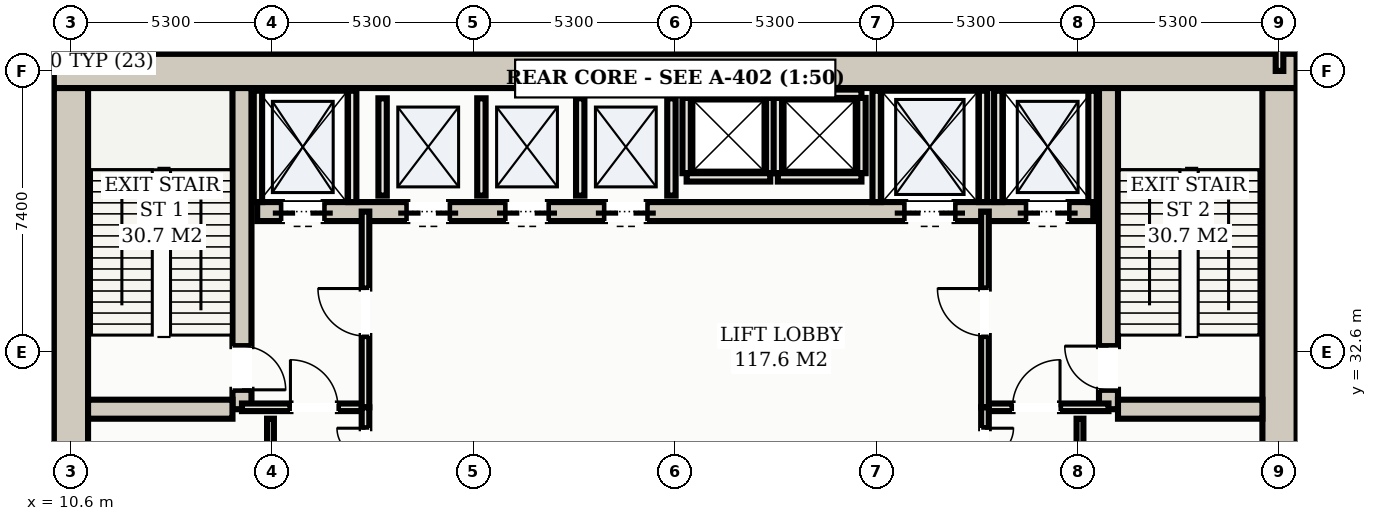
"""IFC4 building model, lengths in metres.
Left out: names, types, materials, properties, quantities, classifications, styles, units other than length and angle.
Written with IfcOpenShell. Run it as: python <this file> out.ifc"""

import sys

from ifc_helpers import new_model, si_unit, direction, frame, frame_2d, origin, place, context, subcontext, project, spatial, rectangle, extrude, element, fill, save


model = new_model("IFC4")
c1 = context("Model", 3, precision=1e-05, world=origin(), true_north=direction((0.0, 1.0)))
c2 = subcontext(c1, "Body", "Model", "MODEL_VIEW")
j1 = project(units=[si_unit("LENGTHUNIT", "METRE"), si_unit("PLANEANGLEUNIT", "RADIAN")], contexts=[c1])
p1 = place(None, origin())
s1 = spatial("IfcSite", under=j1, at=p1, CompositionType="ELEMENT")
p2 = place(p1, origin())
s2 = spatial("IfcBuilding", under=s1, at=p2, CompositionType="ELEMENT")
p3 = place(p2, origin())
s3 = spatial("IfcBuildingStorey", under=s2, at=p3, CompositionType="ELEMENT", Elevation=0.0)
p4 = place(p3, frame((10.15, 40.0, 0.0), z_axis=(0.0, 0.0, 1.0), x_axis=(1.0, 0.0, 0.0)))
e1 = element("IfcWall", 1, at=p4, inside=s3, PredefinedType="SHEAR", context=c2, shape_type="SweptSolid", body=[
    extrude(rectangle(XDim=32.7, YDim=0.9, at=frame_2d((16.35, 0.0))), origin(), (0.0, 0.0, 1.0), 4.95),
])
for number, where, z_axis, x_axis in (
    (2, (10.6, 25.65, 0.0), (0.0, 0.0, 1.0), (0.0, 1.0, 0.0)),
    (3, (42.4, 25.65, 0.0), (0.0, 0.0, 1.0), (0.0, 1.0, 0.0)),
):
    element("IfcWall", number, at=place(p3, frame(where, z_axis=z_axis, x_axis=x_axis)), inside=s3, PredefinedType="SHEAR", context=c2, shape_type="SweptSolid", body=[
        extrude(rectangle(XDim=13.9, YDim=0.9, at=frame_2d((6.95, 0.0))), origin(), (0.0, 0.0, 1.0), 4.95),
    ])
p5 = place(p3, frame((15.1, 31.1, 0.0), z_axis=(0.0, 0.0, 1.0), x_axis=(0.0, 1.0, 0.0)))
e4 = element("IfcWall", 4, at=p5, inside=s3, PredefinedType="SHEAR", context=c2, shape_type="SweptSolid", body=[
    extrude(rectangle(XDim=8.45, YDim=0.5, at=frame_2d((4.225, 0.0))), origin(), (0.0, 0.0, 1.0), 4.95),
])
p6 = place(p5, frame((0.51, 0.0, 0.0)))
e5 = element("IfcOpeningElement", 5, at=p6, cuts=e4, PredefinedType="OPENING", context=c2, shape_type="SweptSolid", body=[
    extrude(rectangle(XDim=1.15, YDim=2.2, at=frame_2d((0.575, 1.1))), frame((0.0, 0.26, 0.0), z_axis=(0.0, -1.0, 0.0), x_axis=(1.0, 0.0, 0.0)), (0.0, 0.0, 1.0), 0.52),
])
p7 = place(p3, frame((11.05, 31.1, 0.0), z_axis=(0.0, 0.0, 1.0), x_axis=(1.0, 0.0, 0.0)))
e6 = element("IfcWall", 6, at=p7, inside=s3, PredefinedType="SHEAR", context=c2, shape_type="SweptSolid", body=[
    extrude(rectangle(XDim=3.8, YDim=0.5, at=frame_2d((1.9, 0.0))), origin(), (0.0, 0.0, 1.0), 4.95),
])
p8 = place(p3, frame((37.9, 31.1, 0.0), z_axis=(0.0, 0.0, 1.0), x_axis=(0.0, 1.0, 0.0)))
e7 = element("IfcWall", 7, at=p8, inside=s3, PredefinedType="SHEAR", context=c2, shape_type="SweptSolid", body=[
    extrude(rectangle(XDim=8.45, YDim=0.5, at=frame_2d((4.225, 0.0))), origin(), (0.0, 0.0, 1.0), 4.95),
])
p9 = place(p8, frame((0.51, 0.0, 0.0)))
e8 = element("IfcOpeningElement", 8, at=p9, cuts=e7, PredefinedType="OPENING", context=c2, shape_type="SweptSolid", body=[
    extrude(rectangle(XDim=1.15, YDim=2.2, at=frame_2d((0.575, 1.1))), frame((0.0, 0.26, 0.0), z_axis=(0.0, -1.0, 0.0), x_axis=(1.0, 0.0, 0.0)), (0.0, 0.0, 1.0), 0.52),
])
p10 = place(p3, frame((38.15, 31.1, 0.0), z_axis=(0.0, 0.0, 1.0), x_axis=(1.0, 0.0, 0.0)))
e9 = element("IfcWall", 9, at=p10, inside=s3, PredefinedType="SHEAR", context=c2, shape_type="SweptSolid", body=[
    extrude(rectangle(XDim=3.8, YDim=0.5, at=frame_2d((1.9, 0.0))), origin(), (0.0, 0.0, 1.0), 4.95),
])
p11 = place(p3, frame((15.5, 36.3, 0.0), z_axis=(0.0, 0.0, 1.0), x_axis=(1.0, 0.0, 0.0)))
e10 = element("IfcWall", 10, at=p11, inside=s3, PredefinedType="SHEAR", context=c2, shape_type="SweptSolid", body=[
    extrude(rectangle(XDim=22.0, YDim=0.5, at=frame_2d((11.0, 0.0))), origin(), (0.0, 0.0, 1.0), 4.95),
])
p12 = place(p11, frame((0.65, 0.0, 0.0)))
e11 = element("IfcOpeningElement", 11, at=p12, cuts=e10, PredefinedType="OPENING", context=c2, shape_type="SweptSolid", body=[
    extrude(rectangle(XDim=1.1, YDim=2.15, at=frame_2d((0.55, 1.075))), frame((0.0, 0.26, 0.0), z_axis=(0.0, -1.0, 0.0), x_axis=(1.0, 0.0, 0.0)), (0.0, 0.0, 1.0), 0.52),
])
p13 = place(p11, frame((20.25, 0.0, 0.0)))
e12 = element("IfcOpeningElement", 12, at=p13, cuts=e10, PredefinedType="OPENING", context=c2, shape_type="SweptSolid", body=[
    extrude(rectangle(XDim=1.1, YDim=2.15, at=frame_2d((0.55, 1.075))), frame((0.0, 0.26, 0.0), z_axis=(0.0, -1.0, 0.0), x_axis=(1.0, 0.0, 0.0)), (0.0, 0.0, 1.0), 0.52),
])
p14 = place(p11, frame((17.05, 0.0, 0.0)))
e13 = element("IfcOpeningElement", 13, at=p14, cuts=e10, PredefinedType="OPENING", context=c2, shape_type="SweptSolid", body=[
    extrude(rectangle(XDim=1.3, YDim=2.2, at=frame_2d((0.65, 1.1))), frame((0.0, 0.26, 0.0), z_axis=(0.0, -1.0, 0.0), x_axis=(1.0, 0.0, 0.0)), (0.0, 0.0, 1.0), 0.52),
])
p15 = place(p11, frame((3.95, 0.0, 0.0)))
e14 = element("IfcOpeningElement", 14, at=p15, cuts=e10, PredefinedType="OPENING", context=c2, shape_type="SweptSolid", body=[
    extrude(rectangle(XDim=1.1, YDim=2.15, at=frame_2d((0.55, 1.075))), frame((0.0, 0.26, 0.0), z_axis=(0.0, -1.0, 0.0), x_axis=(1.0, 0.0, 0.0)), (0.0, 0.0, 1.0), 0.52),
])
p16 = place(p11, frame((6.55, 0.0, 0.0)))
e15 = element("IfcOpeningElement", 15, at=p16, cuts=e10, PredefinedType="OPENING", context=c2, shape_type="SweptSolid", body=[
    extrude(rectangle(XDim=1.1, YDim=2.15, at=frame_2d((0.55, 1.075))), frame((0.0, 0.26, 0.0), z_axis=(0.0, -1.0, 0.0), x_axis=(1.0, 0.0, 0.0)), (0.0, 0.0, 1.0), 0.52),
])
p17 = place(p11, frame((9.15, 0.0, 0.0)))
e16 = element("IfcOpeningElement", 16, at=p17, cuts=e10, PredefinedType="OPENING", context=c2, shape_type="SweptSolid", body=[
    extrude(rectangle(XDim=1.1, YDim=2.15, at=frame_2d((0.55, 1.075))), frame((0.0, 0.26, 0.0), z_axis=(0.0, -1.0, 0.0), x_axis=(1.0, 0.0, 0.0)), (0.0, 0.0, 1.0), 0.52),
])
for number, where, z_axis, x_axis in (
    (17, (15.52, 36.55, 0.0), (0.0, 0.0, 1.0), (0.0, 1.0, 0.0)),
    (18, (18.0, 36.55, 0.0), (0.0, 0.0, 1.0), (0.0, 1.0, 0.0)),
    (19, (35.0, 36.55, 0.0), (0.0, 0.0, 1.0), (0.0, 1.0, 0.0)),
    (20, (37.48, 36.55, 0.0), (0.0, 0.0, 1.0), (0.0, 1.0, 0.0)),
    (21, (31.8, 36.55, 0.0), (0.0, 0.0, 1.0), (0.0, 1.0, 0.0)),
    (22, (34.6, 36.55, 0.0), (0.0, 0.0, 1.0), (0.0, 1.0, 0.0)),
):
    element("IfcWall", number, at=place(p3, frame(where, z_axis=z_axis, x_axis=x_axis)), inside=s3, PredefinedType="SOLIDWALL", context=c2, shape_type="SweptSolid", body=[
        extrude(rectangle(XDim=2.93, YDim=0.22, at=frame_2d((1.465, 0.0))), origin(), (0.0, 0.0, 1.0), 4.95),
    ])
for number, where, z_axis, x_axis in (
    (23, (18.8, 36.72, 0.0), (0.0, 0.0, 1.0), (0.0, 1.0, 0.0)),
    (24, (21.4, 36.72, 0.0), (0.0, 0.0, 1.0), (0.0, 1.0, 0.0)),
    (25, (24.0, 36.72, 0.0), (0.0, 0.0, 1.0), (0.0, 1.0, 0.0)),
    (26, (26.4, 36.72, 0.0), (0.0, 0.0, 1.0), (0.0, 1.0, 0.0)),
):
    element("IfcWall", number, at=place(p3, frame(where, z_axis=z_axis, x_axis=x_axis)), inside=s3, PredefinedType="SOLIDWALL", context=c2, shape_type="SweptSolid", body=[
        extrude(rectangle(XDim=2.56, YDim=0.22, at=frame_2d((1.28, 0.0))), origin(), (0.0, 0.0, 1.0), 4.95),
    ])
for number, where, z_axis, x_axis in (
    (27, (26.8, 37.31, 0.0), (0.0, 0.0, 1.0), (0.0, 1.0, 0.0)),
    (28, (29.0, 37.31, 0.0), (0.0, 0.0, 1.0), (0.0, 1.0, 0.0)),
):
    element("IfcWall", number, at=place(p3, frame(where, z_axis=z_axis, x_axis=x_axis)), inside=s3, PredefinedType="SOLIDWALL", context=c2, shape_type="SweptSolid", body=[
        extrude(rectangle(XDim=1.98, YDim=0.22, at=frame_2d((0.99, 0.0))), origin(), (0.0, 0.0, 1.0), 4.95),
    ])
for number, where, z_axis, x_axis in (
    (29, (26.8, 39.4, 0.0), (0.0, 0.0, 1.0), (1.0, 0.0, 0.0)),
    (30, (26.8, 37.2, 0.0), (0.0, 0.0, 1.0), (1.0, 0.0, 0.0)),
):
    element("IfcWall", number, at=place(p3, frame(where, z_axis=z_axis, x_axis=x_axis)), inside=s3, PredefinedType="SOLIDWALL", context=c2, shape_type="SweptSolid", body=[
        extrude(rectangle(XDim=2.2, YDim=0.22, at=frame_2d((1.1, 0.0))), origin(), (0.0, 0.0, 1.0), 4.95),
    ])
for number, where, z_axis, x_axis in (
    (31, (29.2, 37.31, 0.0), (0.0, 0.0, 1.0), (0.0, 1.0, 0.0)),
    (32, (31.4, 37.31, 0.0), (0.0, 0.0, 1.0), (0.0, 1.0, 0.0)),
):
    element("IfcWall", number, at=place(p3, frame(where, z_axis=z_axis, x_axis=x_axis)), inside=s3, PredefinedType="SOLIDWALL", context=c2, shape_type="SweptSolid", body=[
        extrude(rectangle(XDim=1.98, YDim=0.22, at=frame_2d((0.99, 0.0))), origin(), (0.0, 0.0, 1.0), 4.95),
    ])
for number, where, z_axis, x_axis in (
    (33, (29.2, 39.4, 0.0), (0.0, 0.0, 1.0), (1.0, 0.0, 0.0)),
    (34, (29.2, 37.2, 0.0), (0.0, 0.0, 1.0), (1.0, 0.0, 0.0)),
):
    element("IfcWall", number, at=place(p3, frame(where, z_axis=z_axis, x_axis=x_axis)), inside=s3, PredefinedType="SOLIDWALL", context=c2, shape_type="SweptSolid", body=[
        extrude(rectangle(XDim=2.2, YDim=0.22, at=frame_2d((1.1, 0.0))), origin(), (0.0, 0.0, 1.0), 4.95),
    ])
p18 = place(p3, frame((15.1, 31.15, 0.0), z_axis=(0.0, 0.0, 1.0), x_axis=(1.0, 0.0, 0.0)))
e35 = element("IfcWall", 35, at=p18, inside=s3, PredefinedType="PARTITIONING", context=c2, shape_type="SweptSolid", body=[
    extrude(rectangle(XDim=3.25, YDim=0.2, at=frame_2d((1.625, 0.0))), origin(), (0.0, 0.0, 1.0), 4.95),
])
p19 = place(p18, frame((1.275, 0.0, 0.0)))
e36 = element("IfcOpeningElement", 36, at=p19, cuts=e35, PredefinedType="OPENING", context=c2, shape_type="SweptSolid", body=[
    extrude(rectangle(XDim=1.25, YDim=2.2, at=frame_2d((0.625, 1.1))), frame((0.0, 0.11, 0.0), z_axis=(0.0, -1.0, 0.0), x_axis=(1.0, 0.0, 0.0)), (0.0, 0.0, 1.0), 0.22),
])
p20 = place(p3, frame((18.35, 31.15, 0.0), z_axis=(0.0, 0.0, 1.0), x_axis=(0.0, 1.0, 0.0)))
e37 = element("IfcWall", 37, at=p20, inside=s3, PredefinedType="PARTITIONING", context=c2, shape_type="SweptSolid", body=[
    extrude(rectangle(XDim=5.15, YDim=0.2, at=frame_2d((2.575, 0.0))), origin(), (0.0, 0.0, 1.0), 4.95),
])
p21 = place(p20, frame((1.875, 0.0, 0.0)))
e38 = element("IfcOpeningElement", 38, at=p21, cuts=e37, PredefinedType="OPENING", context=c2, shape_type="SweptSolid", body=[
    extrude(rectangle(XDim=1.25, YDim=2.2, at=frame_2d((0.625, 1.1))), frame((0.0, 0.11, 0.0), z_axis=(0.0, -1.0, 0.0), x_axis=(1.0, 0.0, 0.0)), (0.0, 0.0, 1.0), 0.22),
])
p22 = place(p3, frame((34.65, 31.15, 0.0), z_axis=(0.0, 0.0, 1.0), x_axis=(1.0, 0.0, 0.0)))
e39 = element("IfcWall", 39, at=p22, inside=s3, PredefinedType="PARTITIONING", context=c2, shape_type="SweptSolid", body=[
    extrude(rectangle(XDim=3.25, YDim=0.2, at=frame_2d((1.625, 0.0))), origin(), (0.0, 0.0, 1.0), 4.95),
])
p23 = place(p22, frame((0.725, 0.0, 0.0)))
e40 = element("IfcOpeningElement", 40, at=p23, cuts=e39, PredefinedType="OPENING", context=c2, shape_type="SweptSolid", body=[
    extrude(rectangle(XDim=1.25, YDim=2.2, at=frame_2d((0.625, 1.1))), frame((0.0, 0.11, 0.0), z_axis=(0.0, -1.0, 0.0), x_axis=(1.0, 0.0, 0.0)), (0.0, 0.0, 1.0), 0.22),
])
p24 = place(p3, frame((34.65, 31.15, 0.0), z_axis=(0.0, 0.0, 1.0), x_axis=(0.0, 1.0, 0.0)))
e41 = element("IfcWall", 41, at=p24, inside=s3, PredefinedType="PARTITIONING", context=c2, shape_type="SweptSolid", body=[
    extrude(rectangle(XDim=5.15, YDim=0.2, at=frame_2d((2.575, 0.0))), origin(), (0.0, 0.0, 1.0), 4.95),
])
p25 = place(p24, frame((1.875, 0.0, 0.0)))
e42 = element("IfcOpeningElement", 42, at=p25, cuts=e41, PredefinedType="OPENING", context=c2, shape_type="SweptSolid", body=[
    extrude(rectangle(XDim=1.25, YDim=2.2, at=frame_2d((0.625, 1.1))), frame((0.0, 0.11, 0.0), z_axis=(0.0, -1.0, 0.0), x_axis=(1.0, 0.0, 0.0)), (0.0, 0.0, 1.0), 0.22),
])
p26 = place(p3, frame((15.85, 25.65, 0.0), z_axis=(0.0, 0.0, 1.0), x_axis=(0.0, 1.0, 0.0)))
e43 = element("IfcWall", 43, at=p26, inside=s3, PredefinedType="PARTITIONING", context=c2, shape_type="SweptSolid", body=[
    extrude(rectangle(XDim=5.2, YDim=0.18, at=frame_2d((2.6, 0.0))), origin(), (0.0, 0.0, 1.0), 4.95),
])
p27 = place(p26, frame((2.14, 0.0, 0.0)))
e44 = element("IfcOpeningElement", 44, at=p27, cuts=e43, PredefinedType="OPENING", context=c2, shape_type="SweptSolid", body=[
    extrude(rectangle(XDim=0.92, YDim=2.15, at=frame_2d((0.46, 1.075))), frame((0.0, 0.1, 0.0), z_axis=(0.0, -1.0, 0.0), x_axis=(1.0, 0.0, 0.0)), (0.0, 0.0, 1.0), 0.2),
])
p28 = place(p3, frame((37.15, 25.65, 0.0), z_axis=(0.0, 0.0, 1.0), x_axis=(0.0, 1.0, 0.0)))
e45 = element("IfcWall", 45, at=p28, inside=s3, PredefinedType="PARTITIONING", context=c2, shape_type="SweptSolid", body=[
    extrude(rectangle(XDim=5.2, YDim=0.18, at=frame_2d((2.6, 0.0))), origin(), (0.0, 0.0, 1.0), 4.95),
])
p29 = place(p28, frame((2.14, 0.0, 0.0)))
e46 = element("IfcOpeningElement", 46, at=p29, cuts=e45, PredefinedType="OPENING", context=c2, shape_type="SweptSolid", body=[
    extrude(rectangle(XDim=0.92, YDim=2.15, at=frame_2d((0.46, 1.075))), frame((0.0, 0.1, 0.0), z_axis=(0.0, -1.0, 0.0), x_axis=(1.0, 0.0, 0.0)), (0.0, 0.0, 1.0), 0.2),
])
p30 = place(p3, frame((18.35, 28.55, 0.0), z_axis=(0.0, 0.0, 1.0), x_axis=(0.0, 1.0, 0.0)))
e47 = element("IfcWall", 47, at=p30, inside=s3, PredefinedType="PARTITIONING", context=c2, shape_type="SweptSolid", body=[
    extrude(rectangle(XDim=2.6, YDim=0.2, at=frame_2d((1.3, 0.0))), origin(), (0.0, 0.0, 1.0), 4.95),
])
p31 = place(p30, frame((0.55, 0.0, 0.0)))
e48 = element("IfcOpeningElement", 48, at=p31, cuts=e47, PredefinedType="OPENING", context=c2, shape_type="SweptSolid", body=[
    extrude(rectangle(XDim=1.5, YDim=2.25, at=frame_2d((0.75, 1.125))), frame((0.0, 0.11, 0.0), z_axis=(0.0, -1.0, 0.0), x_axis=(1.0, 0.0, 0.0)), (0.0, 0.0, 1.0), 0.22),
])
p32 = place(p3, frame((34.65, 28.55, 0.0), z_axis=(0.0, 0.0, 1.0), x_axis=(0.0, 1.0, 0.0)))
e49 = element("IfcWall", 49, at=p32, inside=s3, PredefinedType="PARTITIONING", context=c2, shape_type="SweptSolid", body=[
    extrude(rectangle(XDim=2.6, YDim=0.2, at=frame_2d((1.3, 0.0))), origin(), (0.0, 0.0, 1.0), 4.95),
])
p33 = place(p32, frame((0.55, 0.0, 0.0)))
e50 = element("IfcOpeningElement", 50, at=p33, cuts=e49, PredefinedType="OPENING", context=c2, shape_type="SweptSolid", body=[
    extrude(rectangle(XDim=1.5, YDim=2.25, at=frame_2d((0.75, 1.125))), frame((0.0, 0.11, 0.0), z_axis=(0.0, -1.0, 0.0), x_axis=(1.0, 0.0, 0.0)), (0.0, 0.0, 1.0), 0.22),
])
p34 = place(p3, frame((10.6, 40.0, 0.0), z_axis=(0.0, 0.0, 1.0), x_axis=(0.0, 1.0, 0.0)))
e51 = element("IfcWall", 51, at=p34, inside=s3, PredefinedType="PARTITIONING", context=c2, shape_type="SweptSolid", body=[
    extrude(rectangle(XDim=6.47, YDim=0.2, at=frame_2d((3.235, 0.0))), origin(), (0.0, 0.0, 1.0), 4.95),
])
p35 = place(p34, frame((1.3, 0.0, 0.0)))
e52 = element("IfcOpeningElement", 52, at=p35, cuts=e51, PredefinedType="OPENING", context=c2, shape_type="SweptSolid", body=[
    extrude(rectangle(XDim=1.5, YDim=2.25, at=frame_2d((0.75, 1.125))), frame((0.0, 0.11, 0.0), z_axis=(0.0, -1.0, 0.0), x_axis=(1.0, 0.0, 0.0)), (0.0, 0.0, 1.0), 0.22),
])
p36 = place(p3, frame((42.4, 40.0, 0.0), z_axis=(0.0, 0.0, 1.0), x_axis=(0.0, 1.0, 0.0)))
e53 = element("IfcWall", 53, at=p36, inside=s3, PredefinedType="PARTITIONING", context=c2, shape_type="SweptSolid", body=[
    extrude(rectangle(XDim=6.47, YDim=0.2, at=frame_2d((3.235, 0.0))), origin(), (0.0, 0.0, 1.0), 4.95),
])
p37 = place(p36, frame((1.3, 0.0, 0.0)))
e54 = element("IfcOpeningElement", 54, at=p37, cuts=e53, PredefinedType="OPENING", context=c2, shape_type="SweptSolid", body=[
    extrude(rectangle(XDim=1.5, YDim=2.25, at=frame_2d((0.75, 1.125))), frame((0.0, 0.11, 0.0), z_axis=(0.0, -1.0, 0.0), x_axis=(1.0, 0.0, 0.0)), (0.0, 0.0, 1.0), 0.22),
])
p38 = place(p12, frame((1.1, 0.0, 0.0), z_axis=(0.0, 0.0, 1.0), x_axis=(-1.0, 0.0, 0.0)))
e55 = element("IfcDoor", 55, at=p38, inside=s3, OperationType="DOUBLE_DOOR_SLIDING", PredefinedType="DOOR", context=c2, shape_type="SweptSolid", body=[
    extrude(rectangle(XDim=1.1, YDim=2.15, at=frame_2d((0.55, 1.075))), frame((0.0, 0.025, 0.0), z_axis=(0.0, -1.0, 0.0), x_axis=(1.0, 0.0, 0.0)), (0.0, 0.0, 1.0), 0.05),
])
fill(e11, e55)
p39 = place(p13, frame((1.1, 0.0, 0.0), z_axis=(0.0, 0.0, 1.0), x_axis=(-1.0, 0.0, 0.0)))
e56 = element("IfcDoor", 56, at=p39, inside=s3, OperationType="DOUBLE_DOOR_SLIDING", PredefinedType="DOOR", context=c2, shape_type="SweptSolid", body=[
    extrude(rectangle(XDim=1.1, YDim=2.15, at=frame_2d((0.55, 1.075))), frame((0.0, 0.025, 0.0), z_axis=(0.0, -1.0, 0.0), x_axis=(1.0, 0.0, 0.0)), (0.0, 0.0, 1.0), 0.05),
])
fill(e12, e56)
p40 = place(p14, frame((1.3, 0.0, 0.0), z_axis=(0.0, 0.0, 1.0), x_axis=(-1.0, 0.0, 0.0)))
e57 = element("IfcDoor", 57, at=p40, inside=s3, OperationType="DOUBLE_DOOR_SLIDING", PredefinedType="DOOR", context=c2, shape_type="SweptSolid", body=[
    extrude(rectangle(XDim=1.3, YDim=2.2, at=frame_2d((0.65, 1.1))), frame((0.0, 0.025, 0.0), z_axis=(0.0, -1.0, 0.0), x_axis=(1.0, 0.0, 0.0)), (0.0, 0.0, 1.0), 0.05),
])
fill(e13, e57)
p41 = place(p15, frame((1.1, 0.0, 0.0), z_axis=(0.0, 0.0, 1.0), x_axis=(-1.0, 0.0, 0.0)))
e58 = element("IfcDoor", 58, at=p41, inside=s3, OperationType="DOUBLE_DOOR_SLIDING", PredefinedType="DOOR", context=c2, shape_type="SweptSolid", body=[
    extrude(rectangle(XDim=1.1, YDim=2.15, at=frame_2d((0.55, 1.075))), frame((0.0, 0.025, 0.0), z_axis=(0.0, -1.0, 0.0), x_axis=(1.0, 0.0, 0.0)), (0.0, 0.0, 1.0), 0.05),
])
fill(e14, e58)
p42 = place(p16, frame((1.1, 0.0, 0.0), z_axis=(0.0, 0.0, 1.0), x_axis=(-1.0, 0.0, 0.0)))
e59 = element("IfcDoor", 59, at=p42, inside=s3, OperationType="DOUBLE_DOOR_SLIDING", PredefinedType="DOOR", context=c2, shape_type="SweptSolid", body=[
    extrude(rectangle(XDim=1.1, YDim=2.15, at=frame_2d((0.55, 1.075))), frame((0.0, 0.025, 0.0), z_axis=(0.0, -1.0, 0.0), x_axis=(1.0, 0.0, 0.0)), (0.0, 0.0, 1.0), 0.05),
])
fill(e15, e59)
p43 = place(p17, frame((1.1, 0.0, 0.0), z_axis=(0.0, 0.0, 1.0), x_axis=(-1.0, 0.0, 0.0)))
e60 = element("IfcDoor", 60, at=p43, inside=s3, OperationType="DOUBLE_DOOR_SLIDING", PredefinedType="DOOR", context=c2, shape_type="SweptSolid", body=[
    extrude(rectangle(XDim=1.1, YDim=2.15, at=frame_2d((0.55, 1.075))), frame((0.0, 0.025, 0.0), z_axis=(0.0, -1.0, 0.0), x_axis=(1.0, 0.0, 0.0)), (0.0, 0.0, 1.0), 0.05),
])
fill(e16, e60)
p44 = place(p19, origin())
e61 = element("IfcDoor", 61, at=p44, inside=s3, OperationType="SINGLE_SWING_LEFT", PredefinedType="DOOR", context=c2, shape_type="SweptSolid", body=[
    extrude(rectangle(XDim=1.25, YDim=2.2, at=frame_2d((0.625, 1.1))), frame((0.0, 0.025, 0.0), z_axis=(0.0, -1.0, 0.0), x_axis=(1.0, 0.0, 0.0)), (0.0, 0.0, 1.0), 0.05),
])
fill(e36, e61)
p45 = place(p21, origin())
e62 = element("IfcDoor", 62, at=p45, inside=s3, OperationType="SINGLE_SWING_RIGHT", PredefinedType="DOOR", context=c2, shape_type="SweptSolid", body=[
    extrude(rectangle(XDim=1.25, YDim=2.2, at=frame_2d((0.625, 1.1))), frame((0.0, 0.025, 0.0), z_axis=(0.0, -1.0, 0.0), x_axis=(1.0, 0.0, 0.0)), (0.0, 0.0, 1.0), 0.05),
])
fill(e38, e62)
p46 = place(p23, origin())
e63 = element("IfcDoor", 63, at=p46, inside=s3, OperationType="SINGLE_SWING_RIGHT", PredefinedType="DOOR", context=c2, shape_type="SweptSolid", body=[
    extrude(rectangle(XDim=1.25, YDim=2.2, at=frame_2d((0.625, 1.1))), frame((0.0, 0.025, 0.0), z_axis=(0.0, -1.0, 0.0), x_axis=(1.0, 0.0, 0.0)), (0.0, 0.0, 1.0), 0.05),
])
fill(e40, e63)
p47 = place(p25, origin())
e64 = element("IfcDoor", 64, at=p47, inside=s3, OperationType="SINGLE_SWING_RIGHT", PredefinedType="DOOR", context=c2, shape_type="SweptSolid", body=[
    extrude(rectangle(XDim=1.25, YDim=2.2, at=frame_2d((0.625, 1.1))), frame((0.0, 0.025, 0.0), z_axis=(0.0, -1.0, 0.0), x_axis=(1.0, 0.0, 0.0)), (0.0, 0.0, 1.0), 0.05),
])
fill(e42, e64)
p48 = place(p6, frame((1.15, 0.0, 0.0), z_axis=(0.0, 0.0, 1.0), x_axis=(-1.0, 0.0, 0.0)))
e65 = element("IfcDoor", 65, at=p48, inside=s3, OperationType="SINGLE_SWING_RIGHT", PredefinedType="DOOR", context=c2, shape_type="SweptSolid", body=[
    extrude(rectangle(XDim=1.15, YDim=2.2, at=frame_2d((0.575, 1.1))), frame((0.0, 0.025, 0.0), z_axis=(0.0, -1.0, 0.0), x_axis=(1.0, 0.0, 0.0)), (0.0, 0.0, 1.0), 0.05),
])
fill(e5, e65)
p49 = place(p9, origin())
e66 = element("IfcDoor", 66, at=p49, inside=s3, OperationType="SINGLE_SWING_RIGHT", PredefinedType="DOOR", context=c2, shape_type="SweptSolid", body=[
    extrude(rectangle(XDim=1.15, YDim=2.2, at=frame_2d((0.575, 1.1))), frame((0.0, 0.025, 0.0), z_axis=(0.0, -1.0, 0.0), x_axis=(1.0, 0.0, 0.0)), (0.0, 0.0, 1.0), 0.05),
])
fill(e8, e66)
p50 = place(p31, origin())
e67 = element("IfcDoor", 67, at=p50, inside=s3, OperationType="DOUBLE_DOOR_SINGLE_SWING", PredefinedType="DOOR", context=c2, shape_type="SweptSolid", body=[
    extrude(rectangle(XDim=1.5, YDim=2.25, at=frame_2d((0.75, 1.125))), frame((0.0, 0.025, 0.0), z_axis=(0.0, -1.0, 0.0), x_axis=(1.0, 0.0, 0.0)), (0.0, 0.0, 1.0), 0.05),
])
fill(e48, e67)
p51 = place(p33, frame((1.5, 0.0, 0.0), z_axis=(0.0, 0.0, 1.0), x_axis=(-1.0, 0.0, 0.0)))
e68 = element("IfcDoor", 68, at=p51, inside=s3, OperationType="DOUBLE_DOOR_SINGLE_SWING", PredefinedType="DOOR", context=c2, shape_type="SweptSolid", body=[
    extrude(rectangle(XDim=1.5, YDim=2.25, at=frame_2d((0.75, 1.125))), frame((0.0, 0.025, 0.0), z_axis=(0.0, -1.0, 0.0), x_axis=(1.0, 0.0, 0.0)), (0.0, 0.0, 1.0), 0.05),
])
fill(e50, e68)
save(model, sys.argv[1])
